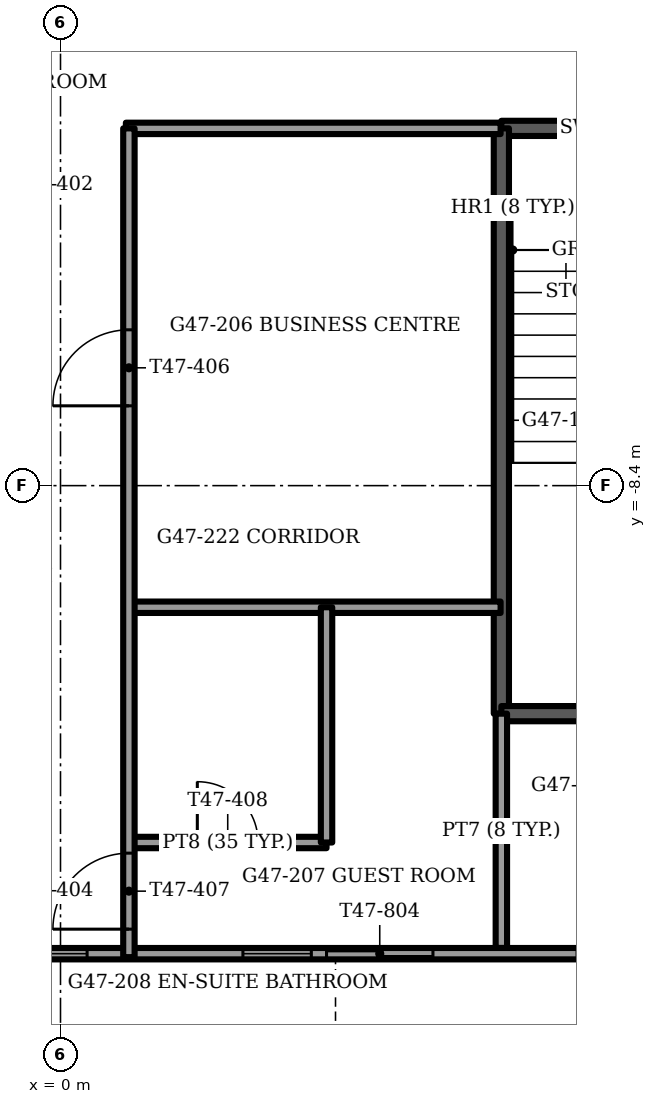
"""IFC4 building model, lengths in metres.
Left out: names, types, materials, properties, quantities, classifications, styles, units other than length and angle.
Written with IfcOpenShell. Run it as: python <this file> out.ifc"""

import sys

from ifc_helpers import new_model, si_unit, direction, frame, frame_2d, origin, place, context, subcontext, project, spatial, rectangle, extrude, element, fill, save


model = new_model("IFC4")
c1 = context("Model", 3, precision=1e-05, world=origin(), true_north=direction((0.0, 1.0)))
c2 = subcontext(c1, "Body", "Model", "MODEL_VIEW")
j1 = project(units=[si_unit("LENGTHUNIT", "METRE"), si_unit("PLANEANGLEUNIT", "RADIAN")], contexts=[c1])
p1 = place(None, origin())
s1 = spatial("IfcSite", under=j1, at=p1, CompositionType="ELEMENT")
p2 = place(p1, origin())
s2 = spatial("IfcBuilding", under=s1, at=p2, CompositionType="ELEMENT")
p3 = place(p2, frame((0.0, 0.0, 190.75)))
s3 = spatial("IfcBuildingStorey", under=s2, at=p3, CompositionType="ELEMENT", Elevation=190.75)
p4 = place(p3, frame((-8.792, -14.558, 0.0), z_axis=(0.0, 0.0, 1.0), x_axis=(1.0, 0.0, 0.0)))
e1 = element("IfcWall", 1, at=p4, inside=s3, PredefinedType="SOLIDWALL", context=c2, shape_type="SweptSolid", body=[
    extrude(rectangle(XDim=17.583, YDim=0.15, at=frame_2d((8.792, 0.0))), origin(), (0.0, 0.0, 1.0), 3.45),
])
p5 = place(p4, frame((3.342, 0.0, 0.15)))
e2 = element("IfcOpeningElement", 2, at=p5, cuts=e1, PredefinedType="OPENING", context=c2, shape_type="SweptSolid", body=[
    extrude(rectangle(XDim=1.6, YDim=2.85, at=frame_2d((0.8, 1.425))), frame((0.0, 0.075, 0.0), z_axis=(0.0, -1.0, 0.0), x_axis=(1.0, 0.0, 0.0)), (0.0, 0.0, 1.0), 0.15),
])
p6 = place(p4, frame((4.991, 0.0, 0.0)))
e3 = element("IfcOpeningElement", 3, at=p6, cuts=e1, PredefinedType="OPENING", context=c2, shape_type="SweptSolid", body=[
    extrude(rectangle(XDim=1.4, YDim=2.4, at=frame_2d((0.7, 1.2))), frame((0.0, 0.075, 0.0), z_axis=(0.0, -1.0, 0.0), x_axis=(1.0, 0.0, 0.0)), (0.0, 0.0, 1.0), 0.15),
])
p7 = place(p4, frame((8.241, 0.0, 0.15)))
e4 = element("IfcOpeningElement", 4, at=p7, cuts=e1, PredefinedType="OPENING", context=c2, shape_type="SweptSolid", body=[
    extrude(rectangle(XDim=0.9, YDim=2.85, at=frame_2d((0.45, 1.425))), frame((0.0, 0.075, 0.0), z_axis=(0.0, -1.0, 0.0), x_axis=(1.0, 0.0, 0.0)), (0.0, 0.0, 1.0), 0.15),
])
p8 = place(p4, frame((11.191, 0.0, 0.15)))
e5 = element("IfcOpeningElement", 5, at=p8, cuts=e1, PredefinedType="OPENING", context=c2, shape_type="SweptSolid", body=[
    extrude(rectangle(XDim=0.9, YDim=2.85, at=frame_2d((0.45, 1.425))), frame((0.0, 0.075, 0.0), z_axis=(0.0, -1.0, 0.0), x_axis=(1.0, 0.0, 0.0)), (0.0, 0.0, 1.0), 0.15),
])
p9 = place(p4, frame((12.292, 0.0, 0.0)))
e6 = element("IfcOpeningElement", 6, at=p9, cuts=e1, PredefinedType="OPENING", context=c2, shape_type="SweptSolid", body=[
    extrude(rectangle(XDim=1.4, YDim=2.4, at=frame_2d((0.7, 1.2))), frame((0.0, 0.075, 0.0), z_axis=(0.0, -1.0, 0.0), x_axis=(1.0, 0.0, 0.0)), (0.0, 0.0, 1.0), 0.15),
])
p10 = place(p4, frame((0.396, 0.0, 0.15)))
e7 = element("IfcOpeningElement", 7, at=p10, cuts=e1, PredefinedType="OPENING", context=c2, shape_type="SweptSolid", body=[
    extrude(rectangle(XDim=1.6, YDim=2.73, at=frame_2d((0.8, 1.365))), frame((0.0, 0.075, 0.0), z_axis=(0.0, -1.0, 0.0), x_axis=(1.0, 0.0, 0.0)), (0.0, 0.0, 1.0), 0.15),
])
p11 = place(p4, frame((15.587, 0.0, 0.15)))
e8 = element("IfcOpeningElement", 8, at=p11, cuts=e1, PredefinedType="OPENING", context=c2, shape_type="SweptSolid", body=[
    extrude(rectangle(XDim=1.6, YDim=2.73, at=frame_2d((0.8, 1.365))), frame((0.0, 0.075, 0.0), z_axis=(0.0, -1.0, 0.0), x_axis=(1.0, 0.0, 0.0)), (0.0, 0.0, 1.0), 0.15),
])
p12 = place(p3, frame((5.8, -3.7, -0.3), z_axis=(0.0, 0.0, 1.0), x_axis=(1.0, 0.0, 0.0)))
e9 = element("IfcWall", 9, at=p12, inside=s3, PredefinedType="SOLIDWALL", context=c2, shape_type="SweptSolid", body=[
    extrude(rectangle(XDim=3.35, YDim=0.2, at=frame_2d((1.675, 0.0))), origin(), (0.0, 0.0, 1.0), 3.75),
])
p13 = place(p12, frame((1.125, 0.0, 0.0)))
e10 = element("IfcOpeningElement", 10, at=p13, cuts=e9, PredefinedType="OPENING", context=c2, shape_type="SweptSolid", body=[
    extrude(rectangle(XDim=1.1, YDim=2.1, at=frame_2d((0.55, 1.05))), frame((0.0, 0.1, 0.0), z_axis=(0.0, -1.0, 0.0), x_axis=(1.0, 0.0, 0.0)), (0.0, 0.0, 1.0), 0.2),
])
p14 = place(p3, frame((5.8, -3.7, -0.3), z_axis=(0.0, 0.0, 1.0), x_axis=(0.0, -1.0, 0.0)))
e11 = element("IfcWall", 11, at=p14, inside=s3, PredefinedType="SOLIDWALL", context=c2, shape_type="SweptSolid", body=[
    extrude(rectangle(XDim=7.7, YDim=0.2, at=frame_2d((3.85, 0.0))), origin(), (0.0, 0.0, 1.0), 3.75),
])
p15 = place(p3, frame((5.8, -11.4, -0.3), z_axis=(0.0, 0.0, 1.0), x_axis=(1.0, 0.0, 0.0)))
e12 = element("IfcWall", 12, at=p15, inside=s3, PredefinedType="SOLIDWALL", context=c2, shape_type="SweptSolid", body=[
    extrude(rectangle(XDim=3.35, YDim=0.2, at=frame_2d((1.675, 0.0))), origin(), (0.0, 0.0, 1.0), 3.75),
])
p16 = place(p3, frame((5.8, -11.4, 0.0), z_axis=(0.0, 0.0, 1.0), x_axis=(0.0, -1.0, 0.0)))
e13 = element("IfcWall", 13, at=p16, inside=s3, PredefinedType="PARTITIONING", context=c2, shape_type="SweptSolid", body=[
    extrude(rectangle(XDim=3.083, YDim=0.15, at=frame_2d((1.542, 0.0))), origin(), (0.0, 0.0, 1.0), 3.45),
])
p17 = place(p3, frame((0.9, -13.095, 0.0), z_axis=(0.0, 0.0, 1.0), x_axis=(1.0, 0.0, 0.0)))
e14 = element("IfcWall", 14, at=p17, inside=s3, PredefinedType="PARTITIONING", context=c2, shape_type="SweptSolid", body=[
    extrude(rectangle(XDim=2.6, YDim=0.15, at=frame_2d((1.3, 0.0))), origin(), (0.0, 0.0, 1.0), 3.45),
])
p18 = place(p17, frame((0.9, 0.0, 0.0)))
e15 = element("IfcOpeningElement", 15, at=p18, cuts=e14, PredefinedType="OPENING", context=c2, shape_type="SweptSolid", body=[
    extrude(rectangle(XDim=0.8, YDim=2.1, at=frame_2d((0.4, 1.05))), frame((0.0, 0.075, 0.0), z_axis=(0.0, -1.0, 0.0), x_axis=(1.0, 0.0, 0.0)), (0.0, 0.0, 1.0), 0.15),
])
p19 = place(p3, frame((0.9, -10.0, 0.0), z_axis=(0.0, 0.0, 1.0), x_axis=(1.0, 0.0, 0.0)))
e16 = element("IfcWall", 16, at=p19, inside=s3, PredefinedType="PARTITIONING", context=c2, shape_type="SweptSolid", body=[
    extrude(rectangle(XDim=4.89, YDim=0.15, at=frame_2d((2.445, 0.0))), origin(), (0.0, 0.0, 1.0), 3.45),
])
p20 = place(p3, frame((0.86, -3.7, 0.0), z_axis=(0.0, 0.0, 1.0), x_axis=(1.0, 0.0, 0.0)))
e17 = element("IfcWall", 17, at=p20, inside=s3, PredefinedType="PARTITIONING", context=c2, shape_type="SweptSolid", body=[
    extrude(rectangle(XDim=4.93, YDim=0.15, at=frame_2d((2.465, 0.0))), origin(), (0.0, 0.0, 1.0), 3.45),
])
p21 = place(p3, frame((3.5, -13.095, 0.0), z_axis=(0.0, 0.0, 1.0), x_axis=(0.0, 1.0, 0.0)))
e18 = element("IfcWall", 18, at=p21, inside=s3, PredefinedType="PARTITIONING", context=c2, shape_type="SweptSolid", body=[
    extrude(rectangle(XDim=3.095, YDim=0.15, at=frame_2d((1.547, 0.0))), origin(), (0.0, 0.0, 1.0), 3.45),
])
p22 = place(p3, frame((0.9, -14.603, 0.0), z_axis=(0.0, 0.0, 1.0), x_axis=(0.0, 1.0, 0.0)))
e19 = element("IfcWall", 19, at=p22, inside=s3, PredefinedType="PARTITIONING", context=c2, shape_type="SweptSolid", body=[
    extrude(rectangle(XDim=10.903, YDim=0.15, at=frame_2d((5.452, 0.0))), origin(), (0.0, 0.0, 1.0), 3.45),
])
p23 = place(p22, frame((7.253, 0.0, 0.0)))
e20 = element("IfcOpeningElement", 20, at=p23, cuts=e19, PredefinedType="OPENING", context=c2, shape_type="SweptSolid", body=[
    extrude(rectangle(XDim=1.0, YDim=2.1, at=frame_2d((0.5, 1.05))), frame((0.0, 0.075, 0.0), z_axis=(0.0, -1.0, 0.0), x_axis=(1.0, 0.0, 0.0)), (0.0, 0.0, 1.0), 0.15),
])
p24 = place(p22, frame((0.368, 0.0, 0.0)))
e21 = element("IfcOpeningElement", 21, at=p24, cuts=e19, PredefinedType="OPENING", context=c2, shape_type="SweptSolid", body=[
    extrude(rectangle(XDim=1.0, YDim=2.1, at=frame_2d((0.5, 1.05))), frame((0.0, 0.075, 0.0), z_axis=(0.0, -1.0, 0.0), x_axis=(1.0, 0.0, 0.0)), (0.0, 0.0, 1.0), 0.15),
])
p25 = place(p7, origin())
e22 = element("IfcWindow", 22, at=p25, inside=s3, PartitioningType="SINGLE_PANEL", PredefinedType="WINDOW", context=c2, shape_type="SweptSolid", body=[
    extrude(rectangle(XDim=0.9, YDim=2.85, at=frame_2d((0.45, 1.425))), frame((0.0, 0.03, 0.0), z_axis=(0.0, -1.0, 0.0), x_axis=(1.0, 0.0, 0.0)), (0.0, 0.0, 1.0), 0.06),
])
fill(e4, e22)
p26 = place(p8, origin())
e23 = element("IfcWindow", 23, at=p26, inside=s3, PartitioningType="SINGLE_PANEL", PredefinedType="WINDOW", context=c2, shape_type="SweptSolid", body=[
    extrude(rectangle(XDim=0.9, YDim=2.85, at=frame_2d((0.45, 1.425))), frame((0.0, 0.03, 0.0), z_axis=(0.0, -1.0, 0.0), x_axis=(1.0, 0.0, 0.0)), (0.0, 0.0, 1.0), 0.06),
])
fill(e5, e23)
p27 = place(p9, origin())
e24 = element("IfcDoor", 24, at=p27, inside=s3, OperationType="SLIDING_TO_LEFT", PredefinedType="DOOR", context=c2, shape_type="SweptSolid", body=[
    extrude(rectangle(XDim=1.4, YDim=2.4, at=frame_2d((0.7, 1.2))), frame((0.0, 0.025, 0.0), z_axis=(0.0, -1.0, 0.0), x_axis=(1.0, 0.0, 0.0)), (0.0, 0.0, 1.0), 0.05),
])
fill(e6, e24)
p28 = place(p11, origin())
e25 = element("IfcWindow", 25, at=p28, inside=s3, PartitioningType="SINGLE_PANEL", PredefinedType="WINDOW", context=c2, shape_type="SweptSolid", body=[
    extrude(rectangle(XDim=1.6, YDim=2.73, at=frame_2d((0.8, 1.365))), frame((0.0, 0.03, 0.0), z_axis=(0.0, -1.0, 0.0), x_axis=(1.0, 0.0, 0.0)), (0.0, 0.0, 1.0), 0.06),
])
fill(e8, e25)
p29 = place(p23, origin())
e26 = element("IfcDoor", 26, at=p29, inside=s3, OperationType="SINGLE_SWING_LEFT", PredefinedType="DOOR", context=c2, shape_type="SweptSolid", body=[
    extrude(rectangle(XDim=1.0, YDim=2.1, at=frame_2d((0.5, 1.05))), frame((0.0, 0.025, 0.0), z_axis=(0.0, -1.0, 0.0), x_axis=(1.0, 0.0, 0.0)), (0.0, 0.0, 1.0), 0.05),
])
fill(e20, e26)
p30 = place(p24, origin())
e27 = element("IfcDoor", 27, at=p30, inside=s3, OperationType="SINGLE_SWING_LEFT", PredefinedType="DOOR", context=c2, shape_type="SweptSolid", body=[
    extrude(rectangle(XDim=1.0, YDim=2.1, at=frame_2d((0.5, 1.05))), frame((0.0, 0.025, 0.0), z_axis=(0.0, -1.0, 0.0), x_axis=(1.0, 0.0, 0.0)), (0.0, 0.0, 1.0), 0.05),
])
fill(e21, e27)
p31 = place(p18, origin())
e28 = element("IfcDoor", 28, at=p31, inside=s3, OperationType="SINGLE_SWING_LEFT", PredefinedType="DOOR", context=c2, shape_type="SweptSolid", body=[
    extrude(rectangle(XDim=0.8, YDim=2.1, at=frame_2d((0.4, 1.05))), frame((0.0, 0.025, 0.0), z_axis=(0.0, -1.0, 0.0), x_axis=(1.0, 0.0, 0.0)), (0.0, 0.0, 1.0), 0.05),
])
fill(e15, e28)
save(model, sys.argv[1])
